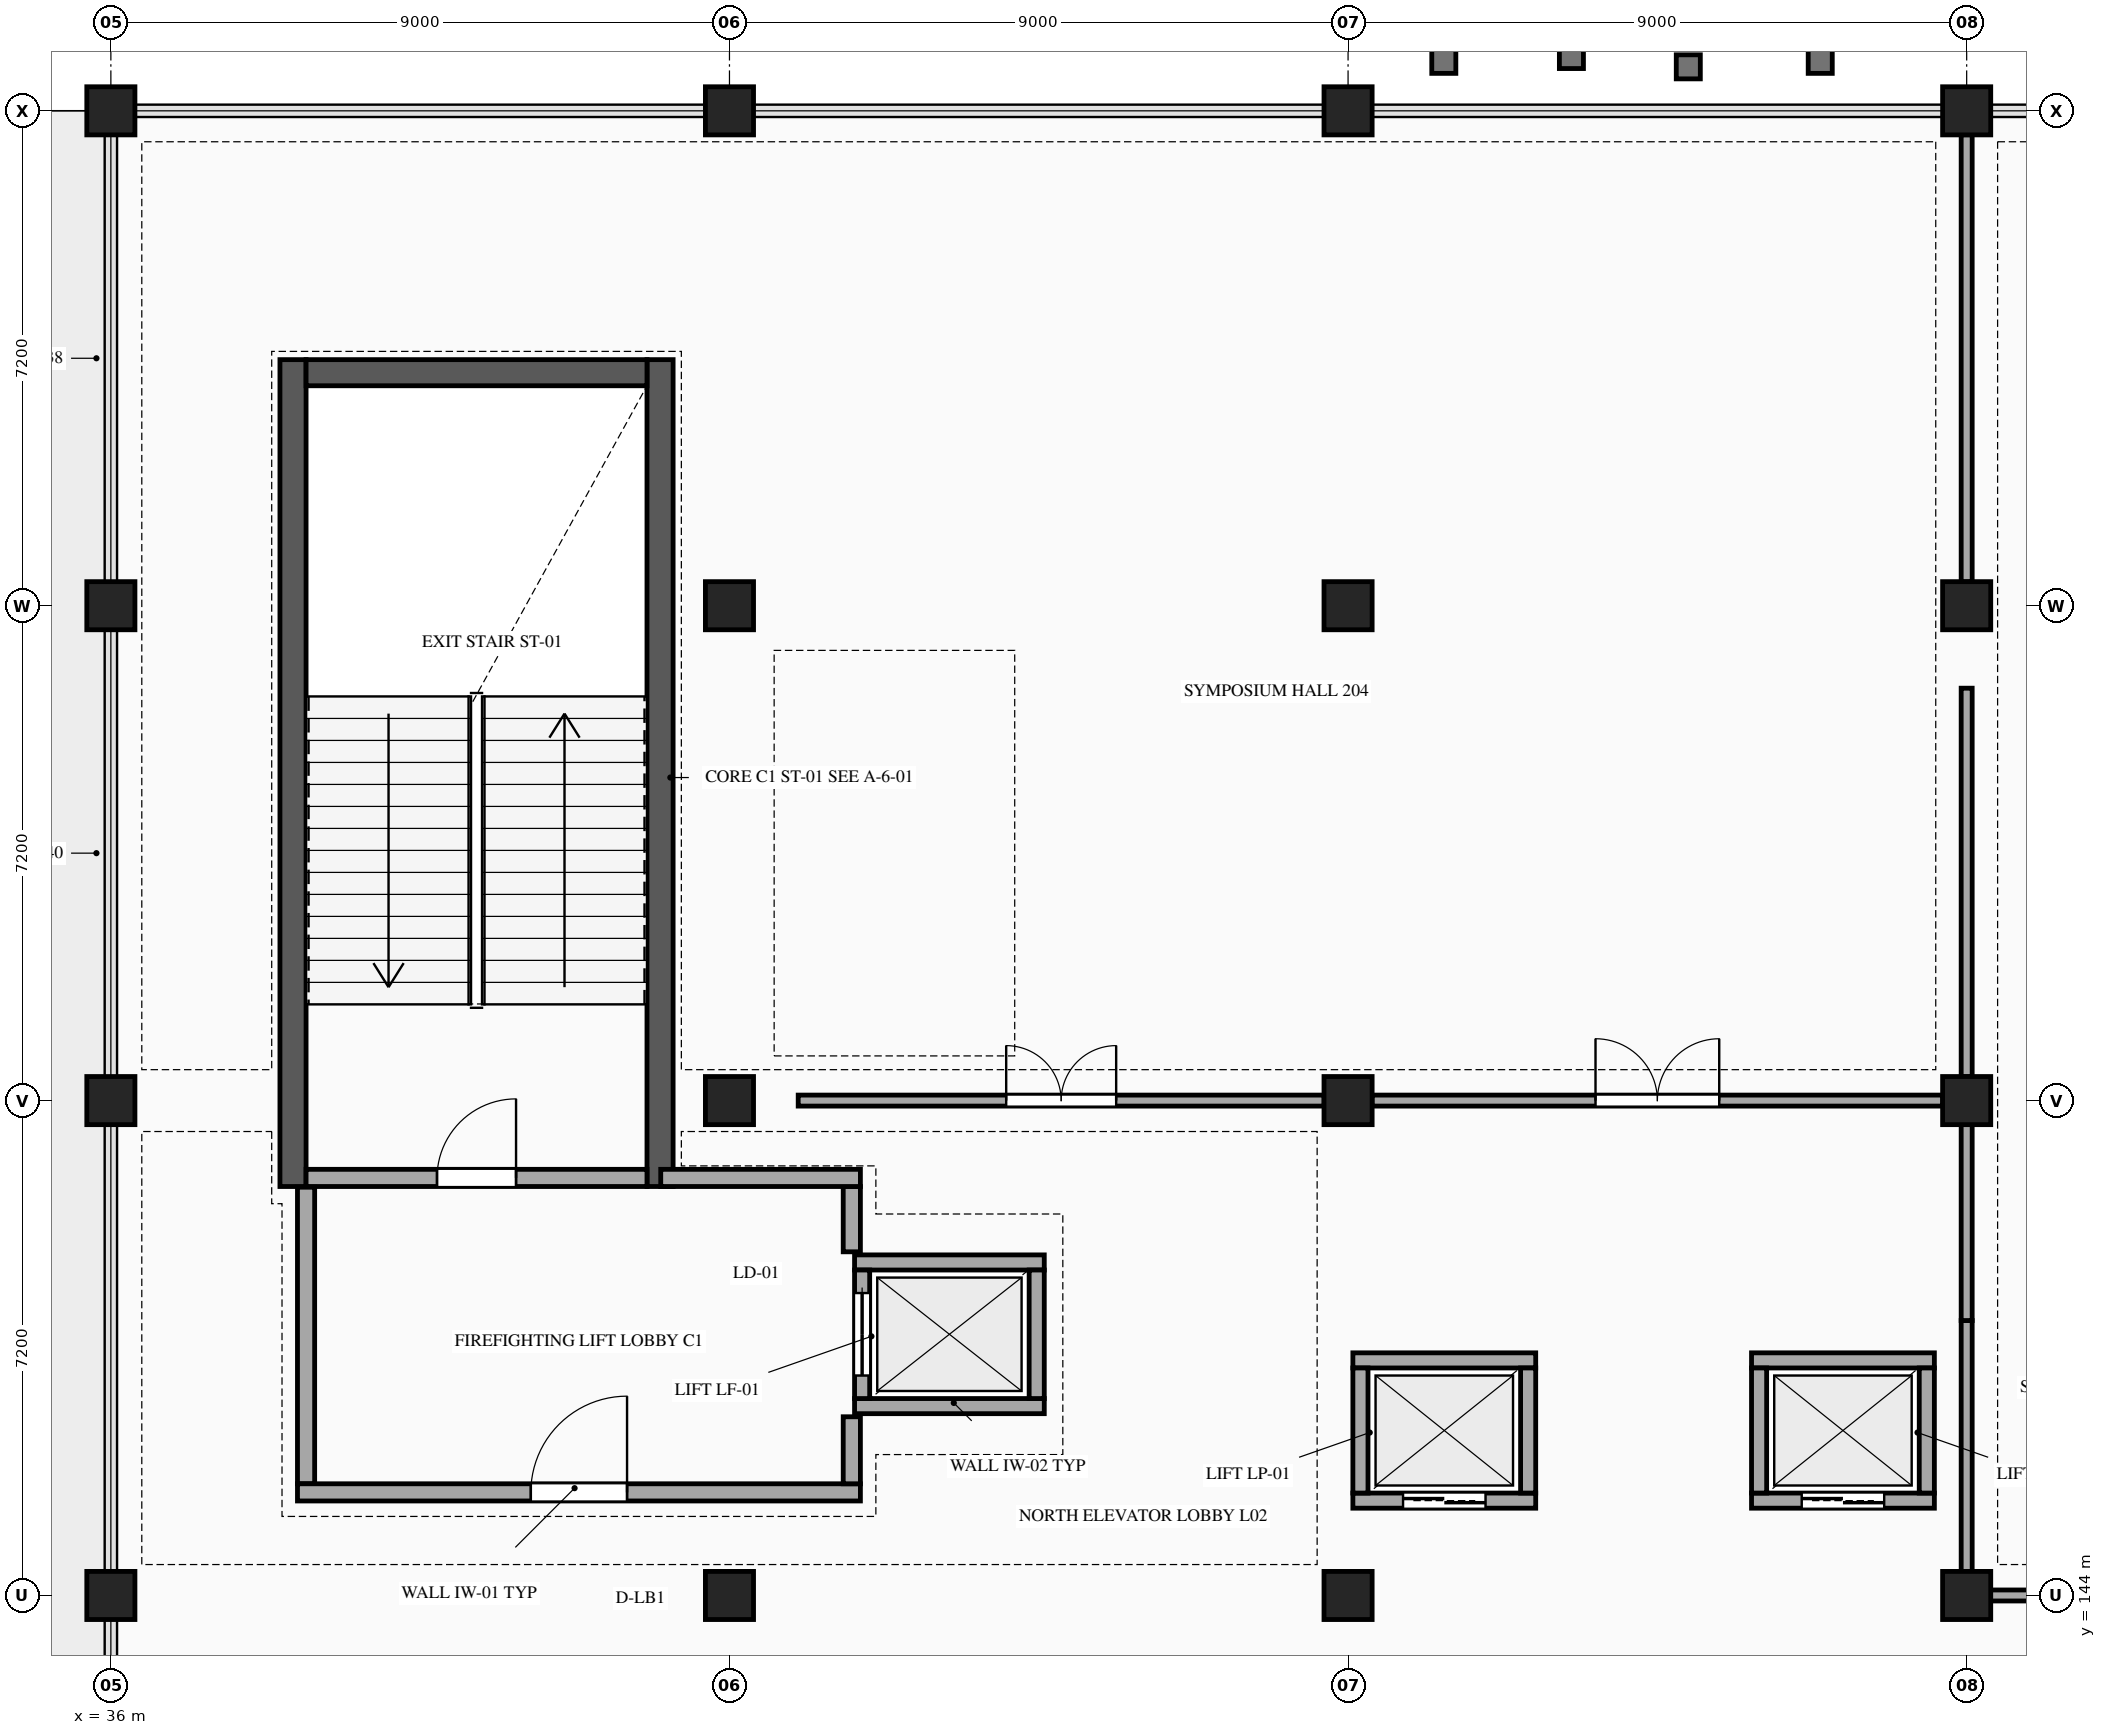
"""IFC4 building model, lengths in metres.
Left out: names, types, materials, properties, quantities, classifications, styles, units other than length and angle.
Written with IfcOpenShell. Run it as: python <this file> out.ifc"""

import sys

from ifc_helpers import new_model, si_unit, direction, frame, frame_2d, origin, origin_2d, place, context, subcontext, project, spatial, rectangle, extrude, element, fill, save


model = new_model("IFC4")
c1 = context("Model", 3, precision=1e-05, world=origin(), true_north=direction((0.0, 1.0)))
c2 = subcontext(c1, "Body", "Model", "MODEL_VIEW")
j1 = project(units=[si_unit("LENGTHUNIT", "METRE"), si_unit("PLANEANGLEUNIT", "RADIAN")], contexts=[c1])
p1 = place(None, origin())
s1 = spatial("IfcSite", under=j1, at=p1, CompositionType="ELEMENT")
p2 = place(p1, origin())
s2 = spatial("IfcBuilding", under=s1, at=p2, CompositionType="ELEMENT")
p3 = place(p2, frame((0.0, 0.0, 10.8)))
s3 = spatial("IfcBuildingStorey", under=s2, at=p3, CompositionType="ELEMENT", Elevation=10.8)
for number, where, z_axis, x_axis in (
    (1, (36.0, 144.0, 0.0), (0.0, 0.0, 1.0), (1.0, 0.0, 0.0)),
    (2, (36.0, 151.2, 0.0), (0.0, 0.0, 1.0), (1.0, 0.0, 0.0)),
    (3, (36.0, 158.4, 0.0), (0.0, 0.0, 1.0), (1.0, 0.0, 0.0)),
    (4, (36.0, 165.6, 0.0), (0.0, 0.0, 1.0), (1.0, 0.0, 0.0)),
    (5, (45.0, 144.0, 0.0), (0.0, 0.0, 1.0), (1.0, 0.0, 0.0)),
    (6, (45.0, 151.2, 0.0), (0.0, 0.0, 1.0), (1.0, 0.0, 0.0)),
    (7, (45.0, 158.4, 0.0), (0.0, 0.0, 1.0), (1.0, 0.0, 0.0)),
    (8, (45.0, 165.6, 0.0), (0.0, 0.0, 1.0), (1.0, 0.0, 0.0)),
    (9, (54.0, 144.0, 0.0), (0.0, 0.0, 1.0), (1.0, 0.0, 0.0)),
    (10, (54.0, 151.2, 0.0), (0.0, 0.0, 1.0), (1.0, 0.0, 0.0)),
    (11, (54.0, 158.4, 0.0), (0.0, 0.0, 1.0), (1.0, 0.0, 0.0)),
    (12, (54.0, 165.6, 0.0), (0.0, 0.0, 1.0), (1.0, 0.0, 0.0)),
    (13, (63.0, 144.0, 0.0), (0.0, 0.0, 1.0), (1.0, 0.0, 0.0)),
    (14, (63.0, 151.2, 0.0), (0.0, 0.0, 1.0), (1.0, 0.0, 0.0)),
    (15, (63.0, 158.4, 0.0), (0.0, 0.0, 1.0), (1.0, 0.0, 0.0)),
    (16, (63.0, 165.6, 0.0), (0.0, 0.0, 1.0), (1.0, 0.0, 0.0)),
):
    element("IfcColumn", number, at=place(p3, frame(where, z_axis=z_axis, x_axis=x_axis)), inside=s3, PredefinedType="COLUMN", context=c2, shape_type="SweptSolid", body=[
        extrude(rectangle(XDim=0.7, YDim=0.7, at=origin_2d()), origin(), (0.0, 0.0, 1.0), 4.5),
    ])
for number, where, z_axis, x_axis in (
    (17, (38.65, 149.95, 0.0), (0.0, 0.0, 1.0), (0.0, 1.0, 0.0)),
    (18, (43.99, 161.98, 0.0), (0.0, 0.0, 1.0), (0.0, -1.0, 0.0)),
):
    element("IfcWall", number, at=place(p3, frame(where, z_axis=z_axis, x_axis=x_axis)), inside=s3, PredefinedType="SHEAR", context=c2, shape_type="SweptSolid", body=[
        extrude(rectangle(XDim=12.03, YDim=0.38, at=frame_2d((6.015, 0.0))), origin(), (0.0, 0.0, 1.0), 4.25),
    ])
p4 = place(p3, frame((38.84, 161.79, 0.0), z_axis=(0.0, 0.0, 1.0), x_axis=(1.0, 0.0, 0.0)))
e19 = element("IfcWall", 19, at=p4, inside=s3, PredefinedType="SHEAR", context=c2, shape_type="SweptSolid", body=[
    extrude(rectangle(XDim=4.96, YDim=0.38, at=frame_2d((2.48, 0.0))), origin(), (0.0, 0.0, 1.0), 4.25),
])
p5 = place(p3, frame((38.84, 150.075, 0.0), z_axis=(0.0, 0.0, 1.0), x_axis=(1.0, 0.0, 0.0)))
e20 = element("IfcWall", 20, at=p5, inside=s3, PredefinedType="STANDARD", context=c2, shape_type="SweptSolid", body=[
    extrude(rectangle(XDim=4.96, YDim=0.25, at=frame_2d((2.48, 0.0))), origin(), (0.0, 0.0, 1.0), 4.22),
])
p6 = place(p5, frame((1.905, 0.0, 0.0)))
e21 = element("IfcOpeningElement", 21, at=p6, cuts=e20, PredefinedType="OPENING", context=c2, shape_type="SweptSolid", body=[
    extrude(rectangle(XDim=1.15, YDim=2.2, at=frame_2d((0.575, 1.1))), frame((0.0, 0.135, 0.0), z_axis=(0.0, -1.0, 0.0), x_axis=(1.0, 0.0, 0.0)), (0.0, 0.0, 1.0), 0.27),
])
for number, where, z_axis, x_axis in (
    (22, (46.82, 146.755, 0.0), (0.0, 0.0, 1.0), (1.0, 0.0, 0.0)),
    (23, (49.58, 148.845, 0.0), (0.0, 0.0, 1.0), (-1.0, 0.0, 0.0)),
):
    element("IfcWall", number, at=place(p3, frame(where, z_axis=z_axis, x_axis=x_axis)), inside=s3, PredefinedType="STANDARD", context=c2, shape_type="SweptSolid", body=[
        extrude(rectangle(XDim=2.76, YDim=0.22, at=frame_2d((1.38, 0.0))), origin(), (0.0, 0.0, 1.0), 4.22),
    ])
p7 = place(p3, frame((46.93, 148.735, 0.0), z_axis=(0.0, 0.0, 1.0), x_axis=(0.0, -1.0, 0.0)))
e24 = element("IfcWall", 24, at=p7, inside=s3, PredefinedType="STANDARD", context=c2, shape_type="SweptSolid", body=[
    extrude(rectangle(XDim=1.87, YDim=0.22, at=frame_2d((0.935, 0.0))), origin(), (0.0, 0.0, 1.0), 4.22),
])
p8 = place(p7, frame((0.335, 0.0, 0.0)))
e25 = element("IfcOpeningElement", 25, at=p8, cuts=e24, PredefinedType="OPENING", context=c2, shape_type="SweptSolid", body=[
    extrude(rectangle(XDim=1.2, YDim=2.2, at=frame_2d((0.6, 1.1))), frame((0.0, 0.12, 0.0), z_axis=(0.0, -1.0, 0.0), x_axis=(1.0, 0.0, 0.0)), (0.0, 0.0, 1.0), 0.24),
])
p9 = place(p3, frame((49.47, 146.865, 0.0), z_axis=(0.0, 0.0, 1.0), x_axis=(0.0, 1.0, 0.0)))
e26 = element("IfcWall", 26, at=p9, inside=s3, PredefinedType="STANDARD", context=c2, shape_type="SweptSolid", body=[
    extrude(rectangle(XDim=1.87, YDim=0.22, at=frame_2d((0.935, 0.0))), origin(), (0.0, 0.0, 1.0), 4.22),
])
p10 = place(p3, frame((54.07, 145.38, 0.0), z_axis=(0.0, 0.0, 1.0), x_axis=(1.0, 0.0, 0.0)))
e27 = element("IfcWall", 27, at=p10, inside=s3, PredefinedType="STANDARD", context=c2, shape_type="SweptSolid", body=[
    extrude(rectangle(XDim=2.66, YDim=0.22, at=frame_2d((1.33, 0.0))), origin(), (0.0, 0.0, 1.0), 3.638),
])
p11 = place(p10, frame((0.73, 0.0, 0.0)))
e28 = element("IfcOpeningElement", 28, at=p11, cuts=e27, PredefinedType="OPENING", context=c2, shape_type="SweptSolid", body=[
    extrude(rectangle(XDim=1.2, YDim=2.2, at=frame_2d((0.6, 1.1))), frame((0.0, 0.12, 0.0), z_axis=(0.0, -1.0, 0.0), x_axis=(1.0, 0.0, 0.0)), (0.0, 0.0, 1.0), 0.24),
])
p12 = place(p3, frame((56.73, 147.42, 0.0), z_axis=(0.0, 0.0, 1.0), x_axis=(-1.0, 0.0, 0.0)))
e29 = element("IfcWall", 29, at=p12, inside=s3, PredefinedType="STANDARD", context=c2, shape_type="SweptSolid", body=[
    extrude(rectangle(XDim=2.66, YDim=0.22, at=frame_2d((1.33, 0.0))), origin(), (0.0, 0.0, 1.0), 3.638),
])
for number, where, z_axis, x_axis in (
    (30, (54.18, 147.31, 0.0), (0.0, 0.0, 1.0), (0.0, -1.0, 0.0)),
    (31, (56.62, 145.49, 0.0), (0.0, 0.0, 1.0), (0.0, 1.0, 0.0)),
):
    element("IfcWall", number, at=place(p3, frame(where, z_axis=z_axis, x_axis=x_axis)), inside=s3, PredefinedType="STANDARD", context=c2, shape_type="SweptSolid", body=[
        extrude(rectangle(XDim=1.82, YDim=0.22, at=frame_2d((0.91, 0.0))), origin(), (0.0, 0.0, 1.0), 3.638),
    ])
p13 = place(p3, frame((59.87, 145.38, 0.0), z_axis=(0.0, 0.0, 1.0), x_axis=(1.0, 0.0, 0.0)))
e32 = element("IfcWall", 32, at=p13, inside=s3, PredefinedType="STANDARD", context=c2, shape_type="SweptSolid", body=[
    extrude(rectangle(XDim=2.66, YDim=0.22, at=frame_2d((1.33, 0.0))), origin(), (0.0, 0.0, 1.0), 4.22),
])
p14 = place(p13, frame((0.73, 0.0, 0.0)))
e33 = element("IfcOpeningElement", 33, at=p14, cuts=e32, PredefinedType="OPENING", context=c2, shape_type="SweptSolid", body=[
    extrude(rectangle(XDim=1.2, YDim=2.2, at=frame_2d((0.6, 1.1))), frame((0.0, 0.12, 0.0), z_axis=(0.0, -1.0, 0.0), x_axis=(1.0, 0.0, 0.0)), (0.0, 0.0, 1.0), 0.24),
])
p15 = place(p3, frame((62.53, 147.42, 0.0), z_axis=(0.0, 0.0, 1.0), x_axis=(-1.0, 0.0, 0.0)))
e34 = element("IfcWall", 34, at=p15, inside=s3, PredefinedType="STANDARD", context=c2, shape_type="SweptSolid", body=[
    extrude(rectangle(XDim=2.66, YDim=0.22, at=frame_2d((1.33, 0.0))), origin(), (0.0, 0.0, 1.0), 4.22),
])
for number, where, z_axis, x_axis in (
    (35, (59.98, 147.31, 0.0), (0.0, 0.0, 1.0), (0.0, -1.0, 0.0)),
    (36, (62.42, 145.49, 0.0), (0.0, 0.0, 1.0), (0.0, 1.0, 0.0)),
):
    element("IfcWall", number, at=place(p3, frame(where, z_axis=z_axis, x_axis=x_axis)), inside=s3, PredefinedType="STANDARD", context=c2, shape_type="SweptSolid", body=[
        extrude(rectangle(XDim=1.82, YDim=0.22, at=frame_2d((0.91, 0.0))), origin(), (0.0, 0.0, 1.0), 4.22),
    ])
p16 = place(p3, frame((38.84, 149.94, 0.0), z_axis=(0.0, 0.0, 1.0), x_axis=(0.0, -1.0, 0.0)))
e37 = element("IfcWall", 37, at=p16, inside=s3, PredefinedType="STANDARD", context=c2, shape_type="SweptSolid", body=[
    extrude(rectangle(XDim=4.315, YDim=0.25, at=frame_2d((2.157, 0.0))), origin(), (0.0, 0.0, 1.0), 3.638),
])
p17 = place(p3, frame((38.715, 145.5, 0.0), z_axis=(0.0, 0.0, 1.0), x_axis=(1.0, 0.0, 0.0)))
e38 = element("IfcWall", 38, at=p17, inside=s3, PredefinedType="STANDARD", context=c2, shape_type="SweptSolid", body=[
    extrude(rectangle(XDim=8.19, YDim=0.25, at=frame_2d((4.095, 0.0))), origin(), (0.0, 0.0, 1.0), 3.638),
])
p18 = place(p17, frame((3.395, 0.0, 0.0)))
e39 = element("IfcOpeningElement", 39, at=p18, cuts=e38, PredefinedType="OPENING", context=c2, shape_type="SweptSolid", body=[
    extrude(rectangle(XDim=1.4, YDim=2.2, at=frame_2d((0.7, 1.1))), frame((0.0, 0.135, 0.0), z_axis=(0.0, -1.0, 0.0), x_axis=(1.0, 0.0, 0.0)), (0.0, 0.0, 1.0), 0.27),
])
p19 = place(p3, frame((46.78, 145.625, 0.0), z_axis=(0.0, 0.0, 1.0), x_axis=(0.0, 1.0, 0.0)))
e40 = element("IfcWall", 40, at=p19, inside=s3, PredefinedType="STANDARD", context=c2, shape_type="SweptSolid", body=[
    extrude(rectangle(XDim=0.975, YDim=0.25, at=frame_2d((0.488, 0.0))), origin(), (0.0, 0.0, 1.0), 3.638),
])
p20 = place(p3, frame((46.78, 149.0, 0.0), z_axis=(0.0, 0.0, 1.0), x_axis=(0.0, 1.0, 0.0)))
e41 = element("IfcWall", 41, at=p20, inside=s3, PredefinedType="STANDARD", context=c2, shape_type="SweptSolid", body=[
    extrude(rectangle(XDim=0.95, YDim=0.25, at=frame_2d((0.475, 0.0))), origin(), (0.0, 0.0, 1.0), 3.638),
])
p21 = place(p3, frame((44.0, 150.075, 0.0), z_axis=(0.0, 0.0, 1.0), x_axis=(1.0, 0.0, 0.0)))
e42 = element("IfcWall", 42, at=p21, inside=s3, PredefinedType="STANDARD", context=c2, shape_type="SweptSolid", body=[
    extrude(rectangle(XDim=2.905, YDim=0.25, at=frame_2d((1.453, 0.0))), origin(), (0.0, 0.0, 1.0), 3.638),
])
p22 = place(p3, frame((63.348, 144.0, 0.0), z_axis=(0.0, 0.0, 1.0), x_axis=(1.0, 0.0, 0.0)))
e43 = element("IfcWall", 43, at=p22, inside=s3, PredefinedType="PARTITIONING", context=c2, shape_type="SweptSolid", body=[
    extrude(rectangle(XDim=8.304, YDim=0.16, at=frame_2d((4.152, 0.0))), origin(), (0.0, 0.0, 1.0), 3.628),
])
p23 = place(p22, frame((3.252, 0.0, 0.0)))
e44 = element("IfcOpeningElement", 44, at=p23, cuts=e43, PredefinedType="OPENING", context=c2, shape_type="SweptSolid", body=[
    extrude(rectangle(XDim=1.8, YDim=2.25, at=frame_2d((0.9, 1.125))), frame((0.0, 0.09, 0.0), z_axis=(0.0, -1.0, 0.0), x_axis=(1.0, 0.0, 0.0)), (0.0, 0.0, 1.0), 0.18),
])
p24 = place(p3, frame((46.0, 151.2, 0.0), z_axis=(0.0, 0.0, 1.0), x_axis=(1.0, 0.0, 0.0)))
e45 = element("IfcWall", 45, at=p24, inside=s3, PredefinedType="PARTITIONING", context=c2, shape_type="SweptSolid", body=[
    extrude(rectangle(XDim=7.652, YDim=0.16, at=frame_2d((3.826, 0.0))), origin(), (0.0, 0.0, 1.0), 3.628),
])
p25 = place(p24, frame((3.026, 0.0, 0.0)))
e46 = element("IfcOpeningElement", 46, at=p25, cuts=e45, PredefinedType="OPENING", context=c2, shape_type="SweptSolid", body=[
    extrude(rectangle(XDim=1.6, YDim=2.2, at=frame_2d((0.8, 1.1))), frame((0.0, 0.09, 0.0), z_axis=(0.0, -1.0, 0.0), x_axis=(1.0, 0.0, 0.0)), (0.0, 0.0, 1.0), 0.18),
])
p26 = place(p3, frame((54.348, 151.2, 0.0), z_axis=(0.0, 0.0, 1.0), x_axis=(1.0, 0.0, 0.0)))
e47 = element("IfcWall", 47, at=p26, inside=s3, PredefinedType="PARTITIONING", context=c2, shape_type="SweptSolid", body=[
    extrude(rectangle(XDim=8.304, YDim=0.16, at=frame_2d((4.152, 0.0))), origin(), (0.0, 0.0, 1.0), 3.628),
])
p27 = place(p26, frame((3.252, 0.0, 0.0)))
e48 = element("IfcOpeningElement", 48, at=p27, cuts=e47, PredefinedType="OPENING", context=c2, shape_type="SweptSolid", body=[
    extrude(rectangle(XDim=1.8, YDim=2.25, at=frame_2d((0.9, 1.125))), frame((0.0, 0.09, 0.0), z_axis=(0.0, -1.0, 0.0), x_axis=(1.0, 0.0, 0.0)), (0.0, 0.0, 1.0), 0.18),
])
p28 = place(p3, frame((63.0, 144.348, 0.0), z_axis=(0.0, 0.0, 1.0), x_axis=(0.0, 1.0, 0.0)))
e49 = element("IfcWall", 49, at=p28, inside=s3, PredefinedType="PARTITIONING", context=c2, shape_type="SweptSolid", body=[
    extrude(rectangle(XDim=3.652, YDim=0.16, at=frame_2d((1.826, 0.0))), origin(), (0.0, 0.0, 1.0), 3.628),
])
p29 = place(p3, frame((63.0, 148.0, 0.0), z_axis=(0.0, 0.0, 1.0), x_axis=(0.0, 1.0, 0.0)))
e50 = element("IfcWall", 50, at=p29, inside=s3, PredefinedType="PARTITIONING", context=c2, shape_type="SweptSolid", body=[
    extrude(rectangle(XDim=2.852, YDim=0.16, at=frame_2d((1.426, 0.0))), origin(), (0.0, 0.0, 1.0), 3.628),
])
p30 = place(p3, frame((63.0, 151.548, 0.0), z_axis=(0.0, 0.0, 1.0), x_axis=(0.0, 1.0, 0.0)))
e51 = element("IfcWall", 51, at=p30, inside=s3, PredefinedType="PARTITIONING", context=c2, shape_type="SweptSolid", body=[
    extrude(rectangle(XDim=5.652, YDim=0.16, at=frame_2d((2.826, 0.0))), origin(), (0.0, 0.0, 1.0), 3.628),
])
p31 = place(p3, frame((63.0, 158.748, 0.0), z_axis=(0.0, 0.0, 1.0), x_axis=(0.0, 1.0, 0.0)))
e52 = element("IfcWall", 52, at=p31, inside=s3, PredefinedType="PARTITIONING", context=c2, shape_type="SweptSolid", body=[
    extrude(rectangle(XDim=6.504, YDim=0.16, at=frame_2d((3.252, 0.0))), origin(), (0.0, 0.0, 1.0), 3.628),
])
p32 = place(p6, origin())
e53 = element("IfcDoor", 53, at=p32, inside=s3, OperationType="SINGLE_SWING_RIGHT", PredefinedType="DOOR", context=c2, shape_type="SweptSolid", body=[
    extrude(rectangle(XDim=1.15, YDim=2.2, at=frame_2d((0.575, 1.1))), frame((0.0, 0.025, 0.0), z_axis=(0.0, -1.0, 0.0), x_axis=(1.0, 0.0, 0.0)), (0.0, 0.0, 1.0), 0.05),
])
fill(e21, e53)
p33 = place(p8, origin())
e54 = element("IfcDoor", 54, at=p33, inside=s3, OperationType="DOUBLE_DOOR_SLIDING", PredefinedType="DOOR", context=c2, shape_type="SweptSolid", body=[
    extrude(rectangle(XDim=1.2, YDim=2.2, at=frame_2d((0.6, 1.1))), frame((0.0, 0.025, 0.0), z_axis=(0.0, -1.0, 0.0), x_axis=(1.0, 0.0, 0.0)), (0.0, 0.0, 1.0), 0.05),
])
fill(e25, e54)
p34 = place(p11, origin())
e55 = element("IfcDoor", 55, at=p34, inside=s3, OperationType="DOUBLE_DOOR_SLIDING", PredefinedType="DOOR", context=c2, shape_type="SweptSolid", body=[
    extrude(rectangle(XDim=1.2, YDim=2.2, at=frame_2d((0.6, 1.1))), frame((0.0, 0.025, 0.0), z_axis=(0.0, -1.0, 0.0), x_axis=(1.0, 0.0, 0.0)), (0.0, 0.0, 1.0), 0.05),
])
fill(e28, e55)
p35 = place(p14, origin())
e56 = element("IfcDoor", 56, at=p35, inside=s3, OperationType="DOUBLE_DOOR_SLIDING", PredefinedType="DOOR", context=c2, shape_type="SweptSolid", body=[
    extrude(rectangle(XDim=1.2, YDim=2.2, at=frame_2d((0.6, 1.1))), frame((0.0, 0.025, 0.0), z_axis=(0.0, -1.0, 0.0), x_axis=(1.0, 0.0, 0.0)), (0.0, 0.0, 1.0), 0.05),
])
fill(e33, e56)
p36 = place(p18, origin())
e57 = element("IfcDoor", 57, at=p36, inside=s3, OperationType="SINGLE_SWING_RIGHT", PredefinedType="DOOR", context=c2, shape_type="SweptSolid", body=[
    extrude(rectangle(XDim=1.4, YDim=2.2, at=frame_2d((0.7, 1.1))), frame((0.0, 0.025, 0.0), z_axis=(0.0, -1.0, 0.0), x_axis=(1.0, 0.0, 0.0)), (0.0, 0.0, 1.0), 0.05),
])
fill(e39, e57)
p37 = place(p25, origin())
e58 = element("IfcDoor", 58, at=p37, inside=s3, OperationType="DOUBLE_DOOR_SINGLE_SWING", PredefinedType="DOOR", context=c2, shape_type="SweptSolid", body=[
    extrude(rectangle(XDim=1.6, YDim=2.2, at=frame_2d((0.8, 1.1))), frame((0.0, 0.025, 0.0), z_axis=(0.0, -1.0, 0.0), x_axis=(1.0, 0.0, 0.0)), (0.0, 0.0, 1.0), 0.05),
])
fill(e46, e58)
p38 = place(p27, origin())
e59 = element("IfcDoor", 59, at=p38, inside=s3, OperationType="DOUBLE_DOOR_SINGLE_SWING", PredefinedType="DOOR", context=c2, shape_type="SweptSolid", body=[
    extrude(rectangle(XDim=1.8, YDim=2.25, at=frame_2d((0.9, 1.125))), frame((0.0, 0.025, 0.0), z_axis=(0.0, -1.0, 0.0), x_axis=(1.0, 0.0, 0.0)), (0.0, 0.0, 1.0), 0.05),
])
fill(e48, e59)
save(model, sys.argv[1])
